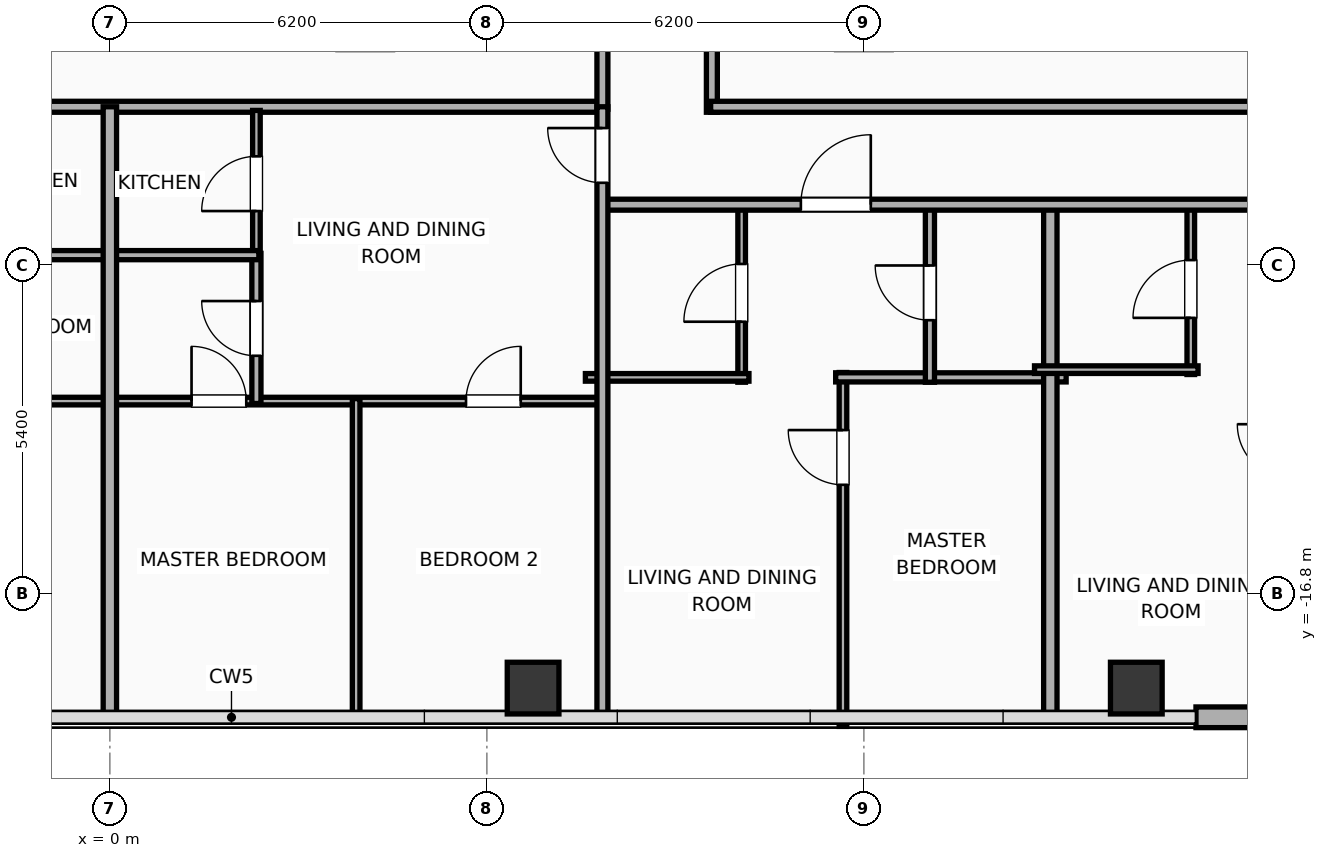
"""IFC4 building model, lengths in metres.
Left out: names, types, materials, properties, quantities, classifications, styles, units other than length and angle.
Written with IfcOpenShell. Run it as: python <this file> out.ifc"""

import sys

from ifc_helpers import new_model, si_unit, direction, frame, frame_2d, origin, origin_2d, place, context, subcontext, project, spatial, rectangle, hollow_rectangle, extrude, element, fill, save


model = new_model("IFC4")
c1 = context("Model", 3, precision=1e-05, world=origin(), true_north=direction((0.0, 1.0)))
c2 = subcontext(c1, "Body", "Model", "MODEL_VIEW")
j1 = project(units=[si_unit("LENGTHUNIT", "METRE"), si_unit("PLANEANGLEUNIT", "RADIAN")], contexts=[c1])
p1 = place(None, origin())
s1 = spatial("IfcSite", under=j1, at=p1, CompositionType="ELEMENT")
p2 = place(p1, origin())
s2 = spatial("IfcBuilding", under=s1, at=p2, CompositionType="ELEMENT")
p3 = place(p2, frame((0.0, 0.0, 208.0)))
s3 = spatial("IfcBuildingStorey", under=s2, at=p3, CompositionType="ELEMENT", Elevation=208.0)
for number, where, z_axis, x_axis in (
    (1, (6.96, -18.35, 0.0), (0.0, 0.0, 1.0), (1.0, 0.0, 0.0)),
    (2, (16.88, -18.35, 0.0), (0.0, 0.0, 1.0), (1.0, 0.0, 0.0)),
):
    element("IfcColumn", number, at=place(p3, frame(where, z_axis=z_axis, x_axis=x_axis)), inside=s3, PredefinedType="COLUMN", context=c2, shape_type="SweptSolid", body=[
        extrude(hollow_rectangle(XDim=0.85, YDim=0.85, WallThickness=0.028, at=origin_2d()), origin(), (0.0, 0.0, 1.0), 3.9),
    ])
p4 = place(p3, frame((26.783, -18.83, 0.0), z_axis=(0.0, 0.0, 1.0), x_axis=(-1.0, 0.0, 0.0)))
e3 = element("IfcWall", 3, at=p4, inside=s3, PredefinedType="ELEMENTEDWALL", context=c2, shape_type="SweptSolid", body=[
    extrude(rectangle(XDim=8.922, YDim=0.34, at=frame_2d((4.461, 0.0))), origin(), (0.0, 0.0, 1.0), 3.65),
])
p5 = place(p4, frame((5.037, 0.0, 0.75)))
e4 = element("IfcOpeningElement", 4, at=p5, cuts=e3, PredefinedType="OPENING", context=c2, shape_type="SweptSolid", body=[
    extrude(rectangle(XDim=1.2, YDim=2.05, at=frame_2d((0.6, 1.025))), frame((0.0, 0.18, 0.0), z_axis=(0.0, -1.0, 0.0), x_axis=(1.0, 0.0, 0.0)), (0.0, 0.0, 1.0), 0.36),
])
p6 = place(p4, frame((1.811, 0.0, 0.75)))
e5 = element("IfcOpeningElement", 5, at=p6, cuts=e3, PredefinedType="OPENING", context=c2, shape_type="SweptSolid", body=[
    extrude(rectangle(XDim=1.2, YDim=2.05, at=frame_2d((0.6, 1.025))), frame((0.0, 0.18, 0.0), z_axis=(0.0, -1.0, 0.0), x_axis=(1.0, 0.0, 0.0)), (0.0, 0.0, 1.0), 0.36),
])
p7 = place(p3, frame((9.9, -8.88, 0.0), z_axis=(0.0, 0.0, 1.0), x_axis=(0.0, 1.0, 0.0)))
e6 = element("IfcWall", 6, at=p7, inside=s3, PredefinedType="PARTITIONING", context=c2, shape_type="SweptSolid", body=[
    extrude(rectangle(XDim=17.76, YDim=0.18, at=frame_2d((8.88, 0.0))), origin(), (0.0, 0.0, 1.0), 3.65),
])
p8 = place(p7, frame((7.442, 0.0, 0.0)))
e7 = element("IfcOpeningElement", 7, at=p8, cuts=e6, PredefinedType="OPENING", context=c2, shape_type="SweptSolid", body=[
    extrude(rectangle(XDim=1.1, YDim=2.05, at=frame_2d((0.55, 1.025))), frame((0.0, 0.1, 0.0), z_axis=(0.0, -1.0, 0.0), x_axis=(1.0, 0.0, 0.0)), (0.0, 0.0, 1.0), 0.2),
])
p9 = place(p3, frame((9.88, -8.79, 0.0), z_axis=(0.0, 0.0, 1.0), x_axis=(1.0, 0.0, 0.0)))
e8 = element("IfcWall", 8, at=p9, inside=s3, PredefinedType="PARTITIONING", context=c2, shape_type="SweptSolid", body=[
    extrude(rectangle(XDim=20.35, YDim=0.18, at=frame_2d((10.175, 0.0))), origin(), (0.0, 0.0, 1.0), 3.65),
])
p10 = place(p3, frame((-8.15, -8.79, 0.0), z_axis=(0.0, 0.0, 1.0), x_axis=(1.0, 0.0, 0.0)))
e9 = element("IfcWall", 9, at=p10, inside=s3, PredefinedType="PARTITIONING", context=c2, shape_type="SweptSolid", body=[
    extrude(rectangle(XDim=16.3, YDim=0.18, at=frame_2d((8.15, 0.0))), origin(), (0.0, 0.0, 1.0), 3.65),
])
p11 = place(p3, frame((8.1, -8.83, 0.0), z_axis=(0.0, 0.0, 1.0), x_axis=(0.0, 1.0, 0.0)))
e10 = element("IfcWall", 10, at=p11, inside=s3, PredefinedType="PARTITIONING", context=c2, shape_type="SweptSolid", body=[
    extrude(rectangle(XDim=17.66, YDim=0.18, at=frame_2d((8.83, 0.0))), origin(), (0.0, 0.0, 1.0), 3.65),
])
p12 = place(p3, frame((12.056, -18.98, 0.0), z_axis=(0.0, 0.0, 1.0), x_axis=(0.0, 1.0, 0.0)))
e11 = element("IfcWall", 11, at=p12, inside=s3, PredefinedType="PARTITIONING", context=c2, shape_type="SweptSolid", body=[
    extrude(rectangle(XDim=5.82, YDim=0.125, at=frame_2d((2.91, 0.0))), origin(), (0.0, 0.0, 1.0), 3.65),
])
p13 = place(p12, frame((3.973, 0.0, 0.0)))
e12 = element("IfcOpeningElement", 12, at=p13, cuts=e11, PredefinedType="OPENING", context=c2, shape_type="SweptSolid", body=[
    extrude(rectangle(XDim=0.9, YDim=2.05, at=frame_2d((0.45, 1.025))), frame((0.0, 0.073, 0.0), z_axis=(0.0, -1.0, 0.0), x_axis=(1.0, 0.0, 0.0)), (0.0, 0.0, 1.0), 0.145),
])
p14 = place(p3, frame((11.936, -13.24, 0.0), z_axis=(0.0, 0.0, 1.0), x_axis=(1.0, 0.0, 0.0)))
e13 = element("IfcWall", 13, at=p14, inside=s3, PredefinedType="PLUMBINGWALL", context=c2, shape_type="SweptSolid", body=[
    extrude(rectangle(XDim=3.79, YDim=0.15, at=frame_2d((1.895, 0.0))), origin(), (0.0, 0.0, 1.0), 3.65),
])
p15 = place(p3, frame((10.39, -13.32, 0.0), z_axis=(0.0, 0.0, 1.0), x_axis=(0.0, 1.0, 0.0)))
e14 = element("IfcWall", 14, at=p15, inside=s3, PredefinedType="PARTITIONING", context=c2, shape_type="SweptSolid", body=[
    extrude(rectangle(XDim=2.94, YDim=0.125, at=frame_2d((1.47, 0.0))), origin(), (0.0, 0.0, 1.0), 3.65),
])
p16 = place(p15, frame((0.995, 0.0, 0.0)))
e15 = element("IfcOpeningElement", 15, at=p16, cuts=e14, PredefinedType="OPENING", context=c2, shape_type="SweptSolid", body=[
    extrude(rectangle(XDim=0.95, YDim=2.05, at=frame_2d((0.475, 1.025))), frame((0.0, 0.073, 0.0), z_axis=(0.0, -1.0, 0.0), x_axis=(1.0, 0.0, 0.0)), (0.0, 0.0, 1.0), 0.145),
])
p17 = place(p3, frame((7.82, -13.24, 0.0), z_axis=(0.0, 0.0, 1.0), x_axis=(1.0, 0.0, 0.0)))
e16 = element("IfcWall", 16, at=p17, inside=s3, PredefinedType="PARTITIONING", context=c2, shape_type="SweptSolid", body=[
    extrude(rectangle(XDim=2.69, YDim=0.125, at=frame_2d((1.345, 0.0))), origin(), (0.0, 0.0, 1.0), 3.65),
])
p18 = place(p3, frame((13.486, -13.32, 0.0), z_axis=(0.0, 0.0, 1.0), x_axis=(0.0, 1.0, 0.0)))
e17 = element("IfcWall", 17, at=p18, inside=s3, PredefinedType="PLUMBINGWALL", context=c2, shape_type="SweptSolid", body=[
    extrude(rectangle(XDim=2.94, YDim=0.15, at=frame_2d((1.47, 0.0))), origin(), (0.0, 0.0, 1.0), 3.65),
])
p19 = place(p18, frame((1.02, 0.0, 0.0)))
e18 = element("IfcOpeningElement", 18, at=p19, cuts=e17, PredefinedType="OPENING", context=c2, shape_type="SweptSolid", body=[
    extrude(rectangle(XDim=0.9, YDim=2.05, at=frame_2d((0.45, 1.025))), frame((0.0, 0.085, 0.0), z_axis=(0.0, -1.0, 0.0), x_axis=(1.0, 0.0, 0.0)), (0.0, 0.0, 1.0), 0.17),
])
p20 = place(p3, frame((15.466, -18.83, 0.0), z_axis=(0.0, 0.0, 1.0), x_axis=(0.0, 1.0, 0.0)))
e19 = element("IfcWall", 19, at=p20, inside=s3, PredefinedType="PARTITIONING", context=c2, shape_type="SweptSolid", body=[
    extrude(rectangle(XDim=8.51, YDim=0.22, at=frame_2d((4.255, 0.0))), origin(), (0.0, 0.0, 1.0), 3.65),
])
p21 = place(p3, frame((17.776, -13.193, 0.0), z_axis=(0.0, 0.0, 1.0), x_axis=(0.0, 1.0, 0.0)))
e20 = element("IfcWall", 20, at=p21, inside=s3, PredefinedType="PARTITIONING", context=c2, shape_type="SweptSolid", body=[
    extrude(rectangle(XDim=2.813, YDim=0.125, at=frame_2d((1.407, 0.0))), origin(), (0.0, 0.0, 1.0), 3.65),
])
p22 = place(p21, frame((0.931, 0.0, 0.0)))
e21 = element("IfcOpeningElement", 21, at=p22, cuts=e20, PredefinedType="OPENING", context=c2, shape_type="SweptSolid", body=[
    extrude(rectangle(XDim=0.95, YDim=2.05, at=frame_2d((0.475, 1.025))), frame((0.0, 0.073, 0.0), z_axis=(0.0, -1.0, 0.0), x_axis=(1.0, 0.0, 0.0)), (0.0, 0.0, 1.0), 0.145),
])
p23 = place(p3, frame((15.206, -13.113, 0.0), z_axis=(0.0, 0.0, 1.0), x_axis=(1.0, 0.0, 0.0)))
e22 = element("IfcWall", 22, at=p23, inside=s3, PredefinedType="PARTITIONING", context=c2, shape_type="SweptSolid", body=[
    extrude(rectangle(XDim=2.69, YDim=0.125, at=frame_2d((1.345, 0.0))), origin(), (0.0, 0.0, 1.0), 3.65),
])
p24 = place(p3, frame((8.08, -10.4, 0.0), z_axis=(0.0, 0.0, 1.0), x_axis=(1.0, 0.0, 0.0)))
e23 = element("IfcWall", 23, at=p24, inside=s3, PredefinedType="PARTITIONING", context=c2, shape_type="SweptSolid", body=[
    extrude(rectangle(XDim=22.15, YDim=0.18, at=frame_2d((11.075, 0.0))), origin(), (0.0, 0.0, 1.0), 3.65),
])
p25 = place(p24, frame((3.283, 0.0, 0.0)))
e24 = element("IfcOpeningElement", 24, at=p25, cuts=e23, PredefinedType="OPENING", context=c2, shape_type="SweptSolid", body=[
    extrude(rectangle(XDim=1.15, YDim=2.05, at=frame_2d((0.575, 1.025))), frame((0.0, 0.1, 0.0), z_axis=(0.0, -1.0, 0.0), x_axis=(1.0, 0.0, 0.0)), (0.0, 0.0, 1.0), 0.2),
])
p26 = place(p24, frame((10.668, 0.0, 0.0)))
e25 = element("IfcOpeningElement", 25, at=p26, cuts=e23, PredefinedType="OPENING", context=c2, shape_type="SweptSolid", body=[
    extrude(rectangle(XDim=1.15, YDim=2.05, at=frame_2d((0.575, 1.025))), frame((0.0, 0.1, 0.0), z_axis=(0.0, -1.0, 0.0), x_axis=(1.0, 0.0, 0.0)), (0.0, 0.0, 1.0), 0.2),
])
p27 = place(p24, frame((18.084, 0.0, 0.0)))
e26 = element("IfcOpeningElement", 26, at=p27, cuts=e23, PredefinedType="OPENING", context=c2, shape_type="SweptSolid", body=[
    extrude(rectangle(XDim=1.15, YDim=2.05, at=frame_2d((0.575, 1.025))), frame((0.0, 0.1, 0.0), z_axis=(0.0, -1.0, 0.0), x_axis=(1.0, 0.0, 0.0)), (0.0, 0.0, 1.0), 0.2),
])
p28 = place(p3, frame((-8.08, -13.63, 0.0), z_axis=(0.0, 0.0, 1.0), x_axis=(1.0, 0.0, 0.0)))
e27 = element("IfcWall", 27, at=p28, inside=s3, PredefinedType="PARTITIONING", context=c2, shape_type="SweptSolid", body=[
    extrude(rectangle(XDim=8.06, YDim=0.125, at=frame_2d((4.03, 0.0))), origin(), (0.0, 0.0, 1.0), 3.65),
])
p29 = place(p28, frame((1.323, 0.0, 0.0)))
e28 = element("IfcOpeningElement", 28, at=p29, cuts=e27, PredefinedType="OPENING", context=c2, shape_type="SweptSolid", body=[
    extrude(rectangle(XDim=0.9, YDim=2.05, at=frame_2d((0.45, 1.025))), frame((0.0, 0.073, 0.0), z_axis=(0.0, -1.0, 0.0), x_axis=(1.0, 0.0, 0.0)), (0.0, 0.0, 1.0), 0.145),
])
p30 = place(p28, frame((4.547, 0.0, 0.0)))
e29 = element("IfcOpeningElement", 29, at=p30, cuts=e27, PredefinedType="OPENING", context=c2, shape_type="SweptSolid", body=[
    extrude(rectangle(XDim=0.9, YDim=2.05, at=frame_2d((0.45, 1.025))), frame((0.0, 0.073, 0.0), z_axis=(0.0, -1.0, 0.0), x_axis=(1.0, 0.0, 0.0)), (0.0, 0.0, 1.0), 0.145),
])
p31 = place(p3, frame((-2.45, -11.23, 0.0), z_axis=(0.0, 0.0, 1.0), x_axis=(1.0, 0.0, 0.0)))
e30 = element("IfcWall", 30, at=p31, inside=s3, PredefinedType="PLUMBINGWALL", context=c2, shape_type="SweptSolid", body=[
    extrude(rectangle(XDim=2.43, YDim=0.15, at=frame_2d((1.215, 0.0))), origin(), (0.0, 0.0, 1.0), 3.65),
])
p32 = place(p3, frame((0.02, -13.63, 0.0), z_axis=(0.0, 0.0, 1.0), x_axis=(1.0, 0.0, 0.0)))
e31 = element("IfcWall", 31, at=p32, inside=s3, PredefinedType="PARTITIONING", context=c2, shape_type="SweptSolid", body=[
    extrude(rectangle(XDim=8.06, YDim=0.125, at=frame_2d((4.03, 0.0))), origin(), (0.0, 0.0, 1.0), 3.65),
])
p33 = place(p32, frame((1.323, 0.0, 0.0)))
e32 = element("IfcOpeningElement", 32, at=p33, cuts=e31, PredefinedType="OPENING", context=c2, shape_type="SweptSolid", body=[
    extrude(rectangle(XDim=0.9, YDim=2.05, at=frame_2d((0.45, 1.025))), frame((0.0, 0.073, 0.0), z_axis=(0.0, -1.0, 0.0), x_axis=(1.0, 0.0, 0.0)), (0.0, 0.0, 1.0), 0.145),
])
p34 = place(p32, frame((5.837, 0.0, 0.0)))
e33 = element("IfcOpeningElement", 33, at=p34, cuts=e31, PredefinedType="OPENING", context=c2, shape_type="SweptSolid", body=[
    extrude(rectangle(XDim=0.9, YDim=2.05, at=frame_2d((0.45, 1.025))), frame((0.0, 0.073, 0.0), z_axis=(0.0, -1.0, 0.0), x_axis=(1.0, 0.0, 0.0)), (0.0, 0.0, 1.0), 0.145),
])
p35 = place(p3, frame((2.41, -11.26, 0.0), z_axis=(0.0, 0.0, 1.0), x_axis=(0.0, 1.0, 0.0)))
e34 = element("IfcWall", 34, at=p35, inside=s3, PredefinedType="PARTITIONING", context=c2, shape_type="SweptSolid", body=[
    extrude(rectangle(XDim=2.41, YDim=0.125, at=frame_2d((1.205, 0.0))), origin(), (0.0, 0.0, 1.0), 3.65),
])
p36 = place(p35, frame((0.755, 0.0, 0.0)))
e35 = element("IfcOpeningElement", 35, at=p36, cuts=e34, PredefinedType="OPENING", context=c2, shape_type="SweptSolid", body=[
    extrude(rectangle(XDim=0.9, YDim=2.05, at=frame_2d((0.45, 1.025))), frame((0.0, 0.073, 0.0), z_axis=(0.0, -1.0, 0.0), x_axis=(1.0, 0.0, 0.0)), (0.0, 0.0, 1.0), 0.145),
])
p37 = place(p3, frame((2.41, -13.67, 0.0), z_axis=(0.0, 0.0, 1.0), x_axis=(0.0, 1.0, 0.0)))
e36 = element("IfcWall", 36, at=p37, inside=s3, PredefinedType="PLUMBINGWALL", context=c2, shape_type="SweptSolid", body=[
    extrude(rectangle(XDim=2.47, YDim=0.15, at=frame_2d((1.235, 0.0))), origin(), (0.0, 0.0, 1.0), 3.65),
])
p38 = place(p37, frame((0.785, 0.0, 0.0)))
e37 = element("IfcOpeningElement", 37, at=p38, cuts=e36, PredefinedType="OPENING", context=c2, shape_type="SweptSolid", body=[
    extrude(rectangle(XDim=0.9, YDim=2.05, at=frame_2d((0.45, 1.025))), frame((0.0, 0.085, 0.0), z_axis=(0.0, -1.0, 0.0), x_axis=(1.0, 0.0, 0.0)), (0.0, 0.0, 1.0), 0.17),
])
p39 = place(p3, frame((0.02, -11.23, 0.0), z_axis=(0.0, 0.0, 1.0), x_axis=(1.0, 0.0, 0.0)))
e38 = element("IfcWall", 38, at=p39, inside=s3, PredefinedType="PLUMBINGWALL", context=c2, shape_type="SweptSolid", body=[
    extrude(rectangle(XDim=2.43, YDim=0.15, at=frame_2d((1.215, 0.0))), origin(), (0.0, 0.0, 1.0), 3.65),
])
p40 = place(p3, frame((4.05, -18.83, 0.0), z_axis=(0.0, 0.0, 1.0), x_axis=(0.0, 1.0, 0.0)))
e39 = element("IfcWall", 39, at=p40, inside=s3, PredefinedType="PARTITIONING", context=c2, shape_type="SweptSolid", body=[
    extrude(rectangle(XDim=5.24, YDim=0.125, at=frame_2d((2.62, 0.0))), origin(), (0.0, 0.0, 1.0), 3.65),
])
p41 = place(p3, frame((8.1, -18.83, 0.0), z_axis=(0.0, 0.0, 1.0), x_axis=(0.0, 1.0, 0.0)))
e40 = element("IfcWall", 40, at=p41, inside=s3, PredefinedType="PARTITIONING", context=c2, shape_type="SweptSolid", body=[
    extrude(rectangle(XDim=10.04, YDim=0.18, at=frame_2d((5.02, 0.0))), origin(), (0.0, 0.0, 1.0), 3.65),
])
p42 = place(p41, frame((8.79, 0.0, 0.0)))
e41 = element("IfcOpeningElement", 41, at=p42, cuts=e40, PredefinedType="OPENING", context=c2, shape_type="SweptSolid", body=[
    extrude(rectangle(XDim=0.9, YDim=2.05, at=frame_2d((0.45, 1.025))), frame((0.0, 0.1, 0.0), z_axis=(0.0, -1.0, 0.0), x_axis=(1.0, 0.0, 0.0)), (0.0, 0.0, 1.0), 0.2),
])
p43 = place(p3, frame((0.0, -18.83, 0.0), z_axis=(0.0, 0.0, 1.0), x_axis=(0.0, 1.0, 0.0)))
e42 = element("IfcWall", 42, at=p43, inside=s3, PredefinedType="PARTITIONING", context=c2, shape_type="SweptSolid", body=[
    extrude(rectangle(XDim=10.04, YDim=0.22, at=frame_2d((5.02, 0.0))), origin(), (0.0, 0.0, 1.0), 3.65),
])
p44 = place(p13, origin())
e43 = element("IfcDoor", 43, at=p44, inside=s3, OperationType="SINGLE_SWING_RIGHT", PredefinedType="DOOR", context=c2, shape_type="SweptSolid", body=[
    extrude(rectangle(XDim=0.9, YDim=2.05, at=frame_2d((0.45, 1.025))), frame((0.0, 0.025, 0.0), z_axis=(0.0, -1.0, 0.0), x_axis=(1.0, 0.0, 0.0)), (0.0, 0.0, 1.0), 0.05),
])
fill(e12, e43)
p45 = place(p16, origin())
e44 = element("IfcDoor", 44, at=p45, inside=s3, OperationType="SINGLE_SWING_LEFT", PredefinedType="DOOR", context=c2, shape_type="SweptSolid", body=[
    extrude(rectangle(XDim=0.95, YDim=2.05, at=frame_2d((0.475, 1.025))), frame((0.0, 0.025, 0.0), z_axis=(0.0, -1.0, 0.0), x_axis=(1.0, 0.0, 0.0)), (0.0, 0.0, 1.0), 0.05),
])
fill(e15, e44)
p46 = place(p19, origin())
e45 = element("IfcDoor", 45, at=p46, inside=s3, OperationType="SINGLE_SWING_RIGHT", PredefinedType="DOOR", context=c2, shape_type="SweptSolid", body=[
    extrude(rectangle(XDim=0.9, YDim=2.05, at=frame_2d((0.45, 1.025))), frame((0.0, 0.025, 0.0), z_axis=(0.0, -1.0, 0.0), x_axis=(1.0, 0.0, 0.0)), (0.0, 0.0, 1.0), 0.05),
])
fill(e18, e45)
p47 = place(p22, origin())
e46 = element("IfcDoor", 46, at=p47, inside=s3, OperationType="SINGLE_SWING_LEFT", PredefinedType="DOOR", context=c2, shape_type="SweptSolid", body=[
    extrude(rectangle(XDim=0.95, YDim=2.05, at=frame_2d((0.475, 1.025))), frame((0.0, 0.025, 0.0), z_axis=(0.0, -1.0, 0.0), x_axis=(1.0, 0.0, 0.0)), (0.0, 0.0, 1.0), 0.05),
])
fill(e21, e46)
p48 = place(p25, origin())
e47 = element("IfcDoor", 47, at=p48, inside=s3, OperationType="SINGLE_SWING_RIGHT", PredefinedType="DOOR", context=c2, shape_type="SweptSolid", body=[
    extrude(rectangle(XDim=1.15, YDim=2.05, at=frame_2d((0.575, 1.025))), frame((0.0, 0.025, 0.0), z_axis=(0.0, -1.0, 0.0), x_axis=(1.0, 0.0, 0.0)), (0.0, 0.0, 1.0), 0.05),
])
fill(e24, e47)
p49 = place(p33, origin())
e48 = element("IfcDoor", 48, at=p49, inside=s3, OperationType="SINGLE_SWING_LEFT", PredefinedType="DOOR", context=c2, shape_type="SweptSolid", body=[
    extrude(rectangle(XDim=0.9, YDim=2.05, at=frame_2d((0.45, 1.025))), frame((0.0, 0.025, 0.0), z_axis=(0.0, -1.0, 0.0), x_axis=(1.0, 0.0, 0.0)), (0.0, 0.0, 1.0), 0.05),
])
fill(e32, e48)
p50 = place(p34, origin())
e49 = element("IfcDoor", 49, at=p50, inside=s3, OperationType="SINGLE_SWING_RIGHT", PredefinedType="DOOR", context=c2, shape_type="SweptSolid", body=[
    extrude(rectangle(XDim=0.9, YDim=2.05, at=frame_2d((0.45, 1.025))), frame((0.0, 0.025, 0.0), z_axis=(0.0, -1.0, 0.0), x_axis=(1.0, 0.0, 0.0)), (0.0, 0.0, 1.0), 0.05),
])
fill(e33, e49)
p51 = place(p36, origin())
e50 = element("IfcDoor", 50, at=p51, inside=s3, OperationType="SINGLE_SWING_LEFT", PredefinedType="DOOR", context=c2, shape_type="SweptSolid", body=[
    extrude(rectangle(XDim=0.9, YDim=2.05, at=frame_2d((0.45, 1.025))), frame((0.0, 0.025, 0.0), z_axis=(0.0, -1.0, 0.0), x_axis=(1.0, 0.0, 0.0)), (0.0, 0.0, 1.0), 0.05),
])
fill(e35, e50)
p52 = place(p38, origin())
e51 = element("IfcDoor", 51, at=p52, inside=s3, OperationType="SINGLE_SWING_RIGHT", PredefinedType="DOOR", context=c2, shape_type="SweptSolid", body=[
    extrude(rectangle(XDim=0.9, YDim=2.05, at=frame_2d((0.45, 1.025))), frame((0.0, 0.025, 0.0), z_axis=(0.0, -1.0, 0.0), x_axis=(1.0, 0.0, 0.0)), (0.0, 0.0, 1.0), 0.05),
])
fill(e37, e51)
p53 = place(p42, origin())
e52 = element("IfcDoor", 52, at=p53, inside=s3, OperationType="SINGLE_SWING_RIGHT", PredefinedType="DOOR", context=c2, shape_type="SweptSolid", body=[
    extrude(rectangle(XDim=0.9, YDim=2.05, at=frame_2d((0.45, 1.025))), frame((0.0, 0.025, 0.0), z_axis=(0.0, -1.0, 0.0), x_axis=(1.0, 0.0, 0.0)), (0.0, 0.0, 1.0), 0.05),
])
fill(e41, e52)
save(model, sys.argv[1])
